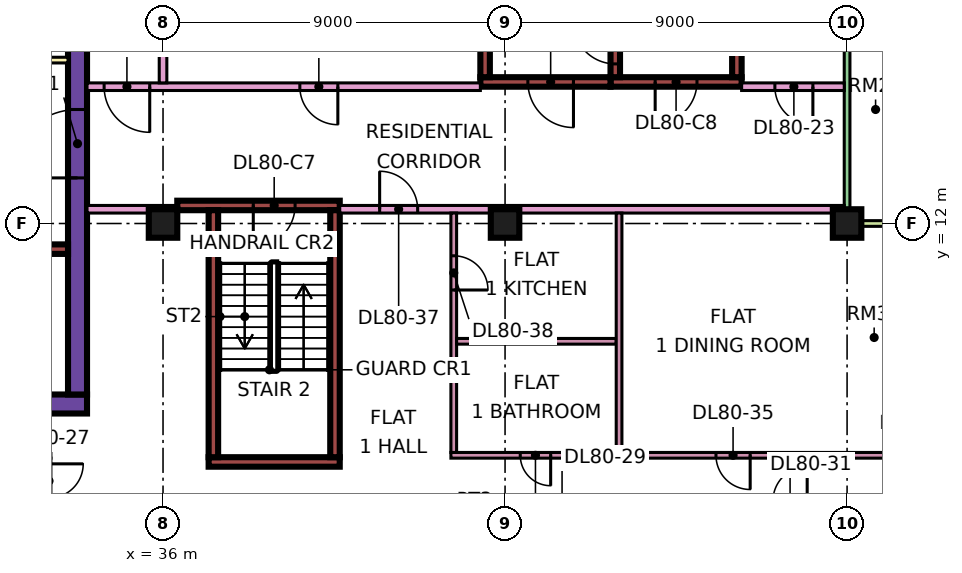
"""IFC4 building model, lengths in metres.
Left out: names, types, materials, properties, quantities, classifications, styles, units other than length and angle.
Written with IfcOpenShell. Run it as: python <this file> out.ifc"""

import sys

from ifc_helpers import new_model, si_unit, direction, frame, frame_2d, origin, origin_2d, place, context, subcontext, project, spatial, rectangle, extrude, element, fill, save


model = new_model("IFC4")
c1 = context("Model", 3, precision=1e-05, world=origin(), true_north=direction((0.0, 1.0)))
c2 = subcontext(c1, "Body", "Model", "MODEL_VIEW")
j1 = project(units=[si_unit("LENGTHUNIT", "METRE"), si_unit("PLANEANGLEUNIT", "RADIAN")], contexts=[c1])
p1 = place(None, origin())
s1 = spatial("IfcSite", under=j1, at=p1, CompositionType="ELEMENT")
p2 = place(p1, origin())
s2 = spatial("IfcBuilding", under=s1, at=p2, CompositionType="ELEMENT")
p3 = place(p2, frame((0.0, 0.0, 346.4)))
s3 = spatial("IfcBuildingStorey", under=s2, at=p3, CompositionType="ELEMENT", Elevation=346.4)
for number, where, z_axis, x_axis in (
    (1, (36.0, 12.0, 0.0), (0.0, 0.0, 1.0), (1.0, 0.0, 0.0)),
    (2, (45.0, 12.0, 0.0), (0.0, 0.0, 1.0), (1.0, 0.0, 0.0)),
    (3, (54.0, 12.0, 0.0), (0.0, 0.0, 1.0), (1.0, 0.0, 0.0)),
):
    element("IfcColumn", number, at=place(p3, frame(where, z_axis=z_axis, x_axis=x_axis)), inside=s3, PredefinedType="COLUMN", context=c2, shape_type="SweptSolid", body=[
        extrude(rectangle(XDim=0.75, YDim=0.75, at=origin_2d()), origin(), (0.0, 0.0, 1.0), 3.75),
    ])
p4 = place(p3, frame((9.0, 7.25, 0.0), z_axis=(0.0, 0.0, 1.0), x_axis=(1.0, 0.0, 0.0)))
e4 = element("IfcWall", 4, at=p4, inside=s3, PredefinedType="SHEAR", context=c2, shape_type="SweptSolid", body=[
    extrude(rectangle(XDim=25.0, YDim=0.5, at=frame_2d((12.5, 0.0))), origin(), (0.0, 0.0, 1.0), 3.75),
])
p5 = place(p3, frame((33.75, 7.5, 0.0), z_axis=(0.0, 0.0, 1.0), x_axis=(0.0, 1.0, 0.0)))
e5 = element("IfcWall", 5, at=p5, inside=s3, PredefinedType="SHEAR", context=c2, shape_type="SweptSolid", body=[
    extrude(rectangle(XDim=12.0, YDim=0.5, at=frame_2d((6.0, 0.0))), origin(), (0.0, 0.0, 1.0), 3.75),
])
p6 = place(p5, frame((5.7, 0.0, 0.0)))
e6 = element("IfcOpeningElement", 6, at=p6, cuts=e5, PredefinedType="OPENING", context=c2, shape_type="SweptSolid", body=[
    extrude(rectangle(XDim=1.8, YDim=2.4, at=frame_2d((0.9, 1.2))), frame((0.0, 0.26, 0.0), z_axis=(0.0, -1.0, 0.0), x_axis=(1.0, 0.0, 0.0)), (0.0, 0.0, 1.0), 0.52),
])
p7 = place(p3, frame((13.45, 11.325, 0.0), z_axis=(0.0, 0.0, 1.0), x_axis=(1.0, 0.0, 0.0)))
e7 = element("IfcWall", 7, at=p7, inside=s3, PredefinedType="SHEAR", context=c2, shape_type="SweptSolid", body=[
    extrude(rectangle(XDim=20.05, YDim=0.25, at=frame_2d((10.025, 0.0))), origin(), (0.0, 0.0, 1.0), 3.75),
])
p8 = place(p7, frame((1.55, 0.0, 0.0)))
e8 = element("IfcOpeningElement", 8, at=p8, cuts=e7, PredefinedType="OPENING", context=c2, shape_type="SweptSolid", body=[
    extrude(rectangle(XDim=0.9, YDim=2.1, at=frame_2d((0.45, 1.05))), frame((0.0, 0.135, 0.0), z_axis=(0.0, -1.0, 0.0), x_axis=(1.0, 0.0, 0.0)), (0.0, 0.0, 1.0), 0.27),
])
p9 = place(p7, frame((5.05, 0.0, 0.0)))
e9 = element("IfcOpeningElement", 9, at=p9, cuts=e7, PredefinedType="OPENING", context=c2, shape_type="SweptSolid", body=[
    extrude(rectangle(XDim=0.9, YDim=2.1, at=frame_2d((0.45, 1.05))), frame((0.0, 0.135, 0.0), z_axis=(0.0, -1.0, 0.0), x_axis=(1.0, 0.0, 0.0)), (0.0, 0.0, 1.0), 0.27),
])
p10 = place(p7, frame((8.425, 0.0, 0.0)))
e10 = element("IfcOpeningElement", 10, at=p10, cuts=e7, PredefinedType="OPENING", context=c2, shape_type="SweptSolid", body=[
    extrude(rectangle(XDim=0.9, YDim=2.1, at=frame_2d((0.45, 1.05))), frame((0.0, 0.135, 0.0), z_axis=(0.0, -1.0, 0.0), x_axis=(1.0, 0.0, 0.0)), (0.0, 0.0, 1.0), 0.27),
])
p11 = place(p7, frame((15.075, 0.0, 0.0)))
e11 = element("IfcOpeningElement", 11, at=p11, cuts=e7, PredefinedType="OPENING", context=c2, shape_type="SweptSolid", body=[
    extrude(rectangle(XDim=0.9, YDim=2.1, at=frame_2d((0.45, 1.05))), frame((0.0, 0.135, 0.0), z_axis=(0.0, -1.0, 0.0), x_axis=(1.0, 0.0, 0.0)), (0.0, 0.0, 1.0), 0.27),
])
p12 = place(p3, frame((37.2, 5.725, 0.0), z_axis=(0.0, 0.0, 1.0), x_axis=(1.0, 0.0, 0.0)))
e12 = element("IfcWall", 12, at=p12, inside=s3, PredefinedType="SHEAR", context=c2, shape_type="SweptSolid", body=[
    extrude(rectangle(XDim=3.45, YDim=0.25, at=frame_2d((1.725, 0.0))), origin(), (0.0, 0.0, 1.0), 3.75),
])
p13 = place(p3, frame((36.375, 12.475, 0.0), z_axis=(0.0, 0.0, 1.0), x_axis=(1.0, 0.0, 0.0)))
e13 = element("IfcWall", 13, at=p13, inside=s3, PredefinedType="SHEAR", context=c2, shape_type="SweptSolid", body=[
    extrude(rectangle(XDim=4.275, YDim=0.25, at=frame_2d((2.137, 0.0))), origin(), (0.0, 0.0, 1.0), 3.75),
])
p14 = place(p13, frame((2.0, 0.0, 0.0)))
e14 = element("IfcOpeningElement", 14, at=p14, cuts=e13, PredefinedType="OPENING", context=c2, shape_type="SweptSolid", body=[
    extrude(rectangle(XDim=1.1, YDim=2.2, at=frame_2d((0.55, 1.1))), frame((0.0, 0.135, 0.0), z_axis=(0.0, -1.0, 0.0), x_axis=(1.0, 0.0, 0.0)), (0.0, 0.0, 1.0), 0.27),
])
for number, where, z_axis, x_axis in (
    (15, (37.325, 5.85, 0.0), (0.0, 0.0, 1.0), (0.0, 1.0, 0.0)),
    (16, (40.525, 5.85, 0.0), (0.0, 0.0, 1.0), (0.0, 1.0, 0.0)),
):
    element("IfcWall", number, at=place(p3, frame(where, z_axis=z_axis, x_axis=x_axis)), inside=s3, PredefinedType="SHEAR", context=c2, shape_type="SweptSolid", body=[
        extrude(rectangle(XDim=6.5, YDim=0.25, at=frame_2d((3.25, 0.0))), origin(), (0.0, 0.0, 1.0), 3.75),
    ])
p15 = place(p3, frame((47.775, 15.725, 0.0), z_axis=(0.0, 0.0, 1.0), x_axis=(1.0, 0.0, 0.0)))
e17 = element("IfcWall", 17, at=p15, inside=s3, PredefinedType="SHEAR", context=c2, shape_type="SweptSolid", body=[
    extrude(rectangle(XDim=3.45, YDim=0.25, at=frame_2d((1.725, 0.0))), origin(), (0.0, 0.0, 1.0), 3.75),
])
p16 = place(p15, frame((1.175, 0.0, 0.0)))
e18 = element("IfcOpeningElement", 18, at=p16, cuts=e17, PredefinedType="OPENING", context=c2, shape_type="SweptSolid", body=[
    extrude(rectangle(XDim=1.1, YDim=2.2, at=frame_2d((0.55, 1.1))), frame((0.0, 0.135, 0.0), z_axis=(0.0, -1.0, 0.0), x_axis=(1.0, 0.0, 0.0)), (0.0, 0.0, 1.0), 0.27),
])
p17 = place(p3, frame((47.9, 15.85, 0.0), z_axis=(0.0, 0.0, 1.0), x_axis=(0.0, 1.0, 0.0)))
e19 = element("IfcWall", 19, at=p17, inside=s3, PredefinedType="SHEAR", context=c2, shape_type="SweptSolid", body=[
    extrude(rectangle(XDim=6.5, YDim=0.25, at=frame_2d((3.25, 0.0))), origin(), (0.0, 0.0, 1.0), 3.75),
])
p18 = place(p17, frame((0.35, 0.0, 0.0)))
e20 = element("IfcOpeningElement", 20, at=p18, cuts=e19, PredefinedType="OPENING", context=c2, shape_type="SweptSolid", body=[
    extrude(rectangle(XDim=1.1, YDim=2.2, at=frame_2d((0.55, 1.1))), frame((0.0, 0.135, 0.0), z_axis=(0.0, -1.0, 0.0), x_axis=(1.0, 0.0, 0.0)), (0.0, 0.0, 1.0), 0.27),
])
p19 = place(p3, frame((51.1, 15.85, 0.0), z_axis=(0.0, 0.0, 1.0), x_axis=(0.0, 1.0, 0.0)))
e21 = element("IfcWall", 21, at=p19, inside=s3, PredefinedType="SHEAR", context=c2, shape_type="SweptSolid", body=[
    extrude(rectangle(XDim=6.5, YDim=0.25, at=frame_2d((3.25, 0.0))), origin(), (0.0, 0.0, 1.0), 3.75),
])
p20 = place(p3, frame((44.35, 15.725, 0.0), z_axis=(0.0, 0.0, 1.0), x_axis=(1.0, 0.0, 0.0)))
e22 = element("IfcWall", 22, at=p20, inside=s3, PredefinedType="SHEAR", context=c2, shape_type="SweptSolid", body=[
    extrude(rectangle(XDim=3.425, YDim=0.25, at=frame_2d((1.712, 0.0))), origin(), (0.0, 0.0, 1.0), 3.75),
])
p21 = place(p20, frame((1.25, 0.0, 0.0)))
e23 = element("IfcOpeningElement", 23, at=p21, cuts=e22, PredefinedType="OPENING", context=c2, shape_type="SweptSolid", body=[
    extrude(rectangle(XDim=1.2, YDim=2.2, at=frame_2d((0.6, 1.1))), frame((0.0, 0.135, 0.0), z_axis=(0.0, -1.0, 0.0), x_axis=(1.0, 0.0, 0.0)), (0.0, 0.0, 1.0), 0.27),
])
p22 = place(p3, frame((44.475, 15.85, 0.0), z_axis=(0.0, 0.0, 1.0), x_axis=(0.0, 1.0, 0.0)))
e24 = element("IfcWall", 24, at=p22, inside=s3, PredefinedType="SHEAR", context=c2, shape_type="SweptSolid", body=[
    extrude(rectangle(XDim=6.5, YDim=0.25, at=frame_2d((3.25, 0.0))), origin(), (0.0, 0.0, 1.0), 3.75),
])
p23 = place(p22, frame((1.75, 0.0, 0.0)))
e25 = element("IfcOpeningElement", 25, at=p23, cuts=e24, PredefinedType="OPENING", context=c2, shape_type="SweptSolid", body=[
    extrude(rectangle(XDim=1.1, YDim=2.2, at=frame_2d((0.55, 1.1))), frame((0.0, 0.135, 0.0), z_axis=(0.0, -1.0, 0.0), x_axis=(1.0, 0.0, 0.0)), (0.0, 0.0, 1.0), 0.27),
])
p24 = place(p22, frame((4.3, 0.0, 0.0)))
e26 = element("IfcOpeningElement", 26, at=p24, cuts=e24, PredefinedType="OPENING", context=c2, shape_type="SweptSolid", body=[
    extrude(rectangle(XDim=1.1, YDim=2.2, at=frame_2d((0.55, 1.1))), frame((0.0, 0.135, 0.0), z_axis=(0.0, -1.0, 0.0), x_axis=(1.0, 0.0, 0.0)), (0.0, 0.0, 1.0), 0.27),
])
p25 = place(p3, frame((54.0, 12.075, 0.0), z_axis=(0.0, 0.0, 1.0), x_axis=(0.0, 1.0, 0.0)))
e27 = element("IfcWall", 27, at=p25, inside=s3, PredefinedType="SOLIDWALL", context=c2, shape_type="SweptSolid", body=[
    extrude(rectangle(XDim=10.35, YDim=0.15, at=frame_2d((5.175, 0.0))), origin(), (0.0, 0.0, 1.0), 3.35),
])
p26 = place(p25, frame((4.538, 0.0, 0.45)))
e28 = element("IfcOpeningElement", 28, at=p26, cuts=e27, PredefinedType="OPENING", context=c2, shape_type="SweptSolid", body=[
    extrude(rectangle(XDim=4.8, YDim=2.4, at=frame_2d((2.4, 1.2))), frame((0.0, 0.085, 0.0), z_axis=(0.0, -1.0, 0.0), x_axis=(1.0, 0.0, 0.0)), (0.0, 0.0, 1.0), 0.17),
])
p27 = place(p3, frame((55.5, 12.0, 0.0), z_axis=(0.0, 0.0, 1.0), x_axis=(-1.0, 0.0, 0.0)))
e29 = element("IfcWall", 29, at=p27, inside=s3, PredefinedType="SOLIDWALL", context=c2, shape_type="SweptSolid", body=[
    extrude(rectangle(XDim=1.5, YDim=0.15, at=frame_2d((0.75, 0.0))), origin(), (0.0, 0.0, 1.0), 3.35),
])
p28 = place(p3, frame((31.5, 16.3, 0.0), z_axis=(0.0, 0.0, 1.0), x_axis=(1.0, 0.0, 0.0)))
e30 = element("IfcWall", 30, at=p28, inside=s3, PredefinedType="PARTITIONING", context=c2, shape_type="SweptSolid", body=[
    extrude(rectangle(XDim=2.0, YDim=0.15, at=frame_2d((1.0, 0.0))), origin(), (0.0, 0.0, 1.0), 3.35),
])
p29 = place(p3, frame((34.0, 12.375, 0.0), z_axis=(0.0, 0.0, 1.0), x_axis=(1.0, 0.0, 0.0)))
e31 = element("IfcWall", 31, at=p29, inside=s3, PredefinedType="PARTITIONING", context=c2, shape_type="SweptSolid", body=[
    extrude(rectangle(XDim=2.376, YDim=0.2, at=frame_2d((1.188, 0.0))), origin(), (0.0, 0.0, 1.0), 3.35),
])
p30 = place(p3, frame((34.0, 15.6, 0.0), z_axis=(0.0, 0.0, 1.0), x_axis=(1.0, 0.0, 0.0)))
e32 = element("IfcWall", 32, at=p30, inside=s3, PredefinedType="PARTITIONING", context=c2, shape_type="SweptSolid", body=[
    extrude(rectangle(XDim=10.35, YDim=0.2, at=frame_2d((5.175, 0.0))), origin(), (0.0, 0.0, 1.0), 3.35),
])
p31 = place(p30, frame((5.6, 0.0, 0.0)))
e33 = element("IfcOpeningElement", 33, at=p31, cuts=e32, PredefinedType="OPENING", context=c2, shape_type="SweptSolid", body=[
    extrude(rectangle(XDim=1.0, YDim=2.1, at=frame_2d((0.5, 1.05))), frame((0.0, 0.11, 0.0), z_axis=(0.0, -1.0, 0.0), x_axis=(1.0, 0.0, 0.0)), (0.0, 0.0, 1.0), 0.22),
])
p32 = place(p30, frame((0.45, 0.0, 0.0)))
e34 = element("IfcOpeningElement", 34, at=p32, cuts=e32, PredefinedType="OPENING", context=c2, shape_type="SweptSolid", body=[
    extrude(rectangle(XDim=1.2, YDim=2.1, at=frame_2d((0.6, 1.05))), frame((0.0, 0.11, 0.0), z_axis=(0.0, -1.0, 0.0), x_axis=(1.0, 0.0, 0.0)), (0.0, 0.0, 1.0), 0.22),
])
p33 = place(p3, frame((36.0, 15.7, 0.0), z_axis=(0.0, 0.0, 1.0), x_axis=(0.0, 1.0, 0.0)))
e35 = element("IfcWall", 35, at=p33, inside=s3, PredefinedType="PARTITIONING", context=c2, shape_type="SweptSolid", body=[
    extrude(rectangle(XDim=8.3, YDim=0.2, at=frame_2d((4.15, 0.0))), origin(), (0.0, 0.0, 1.0), 3.35),
])
p34 = place(p3, frame((40.65, 12.375, 0.0), z_axis=(0.0, 0.0, 1.0), x_axis=(1.0, 0.0, 0.0)))
e36 = element("IfcWall", 36, at=p34, inside=s3, PredefinedType="PARTITIONING", context=c2, shape_type="SweptSolid", body=[
    extrude(rectangle(XDim=13.276, YDim=0.2, at=frame_2d((6.638, 0.0))), origin(), (0.0, 0.0, 1.0), 3.35),
])
p35 = place(p34, frame((1.05, 0.0, 0.0)))
e37 = element("IfcOpeningElement", 37, at=p35, cuts=e36, PredefinedType="OPENING", context=c2, shape_type="SweptSolid", body=[
    extrude(rectangle(XDim=1.0, YDim=2.1, at=frame_2d((0.5, 1.05))), frame((0.0, 0.11, 0.0), z_axis=(0.0, -1.0, 0.0), x_axis=(1.0, 0.0, 0.0)), (0.0, 0.0, 1.0), 0.22),
])
p36 = place(p3, frame((43.575, 5.9, 0.0), z_axis=(0.0, 0.0, 1.0), x_axis=(1.0, 0.0, 0.0)))
e38 = element("IfcWall", 38, at=p36, inside=s3, PredefinedType="PARTITIONING", context=c2, shape_type="SweptSolid", body=[
    extrude(rectangle(XDim=11.775, YDim=0.15, at=frame_2d((5.888, 0.0))), origin(), (0.0, 0.0, 1.0), 3.35),
])
p37 = place(p36, frame((1.825, 0.0, 0.0)))
e39 = element("IfcOpeningElement", 39, at=p37, cuts=e38, PredefinedType="OPENING", context=c2, shape_type="SweptSolid", body=[
    extrude(rectangle(XDim=0.8, YDim=2.1, at=frame_2d((0.4, 1.05))), frame((0.0, 0.085, 0.0), z_axis=(0.0, -1.0, 0.0), x_axis=(1.0, 0.0, 0.0)), (0.0, 0.0, 1.0), 0.17),
])
p38 = place(p36, frame((6.975, 0.0, 0.0)))
e40 = element("IfcOpeningElement", 40, at=p38, cuts=e38, PredefinedType="OPENING", context=c2, shape_type="SweptSolid", body=[
    extrude(rectangle(XDim=0.9, YDim=2.1, at=frame_2d((0.45, 1.05))), frame((0.0, 0.085, 0.0), z_axis=(0.0, -1.0, 0.0), x_axis=(1.0, 0.0, 0.0)), (0.0, 0.0, 1.0), 0.17),
])
p39 = place(p3, frame((43.65, 5.975, 0.0), z_axis=(0.0, 0.0, 1.0), x_axis=(0.0, 1.0, 0.0)))
e41 = element("IfcWall", 41, at=p39, inside=s3, PredefinedType="PARTITIONING", context=c2, shape_type="SweptSolid", body=[
    extrude(rectangle(XDim=6.3, YDim=0.15, at=frame_2d((3.15, 0.0))), origin(), (0.0, 0.0, 1.0), 3.35),
])
p40 = place(p39, frame((4.275, 0.0, 0.0)))
e42 = element("IfcOpeningElement", 42, at=p40, cuts=e41, PredefinedType="OPENING", context=c2, shape_type="SweptSolid", body=[
    extrude(rectangle(XDim=0.9, YDim=2.1, at=frame_2d((0.45, 1.05))), frame((0.0, 0.085, 0.0), z_axis=(0.0, -1.0, 0.0), x_axis=(1.0, 0.0, 0.0)), (0.0, 0.0, 1.0), 0.17),
])
p41 = place(p3, frame((43.725, 8.9, 0.0), z_axis=(0.0, 0.0, 1.0), x_axis=(1.0, 0.0, 0.0)))
e43 = element("IfcWall", 43, at=p41, inside=s3, PredefinedType="PARTITIONING", context=c2, shape_type="SweptSolid", body=[
    extrude(rectangle(XDim=4.2, YDim=0.15, at=frame_2d((2.1, 0.0))), origin(), (0.0, 0.0, 1.0), 3.35),
])
p42 = place(p3, frame((48.0, 5.975, 0.0), z_axis=(0.0, 0.0, 1.0), x_axis=(0.0, 1.0, 0.0)))
e44 = element("IfcWall", 44, at=p42, inside=s3, PredefinedType="PARTITIONING", context=c2, shape_type="SweptSolid", body=[
    extrude(rectangle(XDim=6.3, YDim=0.15, at=frame_2d((3.15, 0.0))), origin(), (0.0, 0.0, 1.0), 3.35),
])
p43 = place(p3, frame((51.225, 15.6, 0.0), z_axis=(0.0, 0.0, 1.0), x_axis=(1.0, 0.0, 0.0)))
e45 = element("IfcWall", 45, at=p43, inside=s3, PredefinedType="PARTITIONING", context=c2, shape_type="SweptSolid", body=[
    extrude(rectangle(XDim=2.701, YDim=0.2, at=frame_2d((1.351, 0.0))), origin(), (0.0, 0.0, 1.0), 3.35),
])
p44 = place(p43, frame((0.875, 0.0, 0.0)))
e46 = element("IfcOpeningElement", 46, at=p44, cuts=e45, PredefinedType="OPENING", context=c2, shape_type="SweptSolid", body=[
    extrude(rectangle(XDim=1.0, YDim=2.1, at=frame_2d((0.5, 1.05))), frame((0.0, 0.11, 0.0), z_axis=(0.0, -1.0, 0.0), x_axis=(1.0, 0.0, 0.0)), (0.0, 0.0, 1.0), 0.22),
])
p45 = place(p6, origin())
e47 = element("IfcDoor", 47, at=p45, inside=s3, OperationType="DOUBLE_DOOR_SINGLE_SWING", PredefinedType="DOOR", context=c2, shape_type="SweptSolid", body=[
    extrude(rectangle(XDim=1.8, YDim=2.4, at=frame_2d((0.9, 1.2))), frame((0.0, 0.025, 0.0), z_axis=(0.0, -1.0, 0.0), x_axis=(1.0, 0.0, 0.0)), (0.0, 0.0, 1.0), 0.05),
])
fill(e6, e47)
p46 = place(p14, frame((1.1, 0.0, 0.0), z_axis=(0.0, 0.0, 1.0), x_axis=(-1.0, 0.0, 0.0)))
e48 = element("IfcDoor", 48, at=p46, inside=s3, OperationType="SINGLE_SWING_LEFT", PredefinedType="DOOR", context=c2, shape_type="SweptSolid", body=[
    extrude(rectangle(XDim=1.1, YDim=2.2, at=frame_2d((0.55, 1.1))), frame((0.0, 0.025, 0.0), z_axis=(0.0, -1.0, 0.0), x_axis=(1.0, 0.0, 0.0)), (0.0, 0.0, 1.0), 0.05),
])
fill(e14, e48)
p47 = place(p16, frame((1.1, 0.0, 0.0), z_axis=(0.0, 0.0, 1.0), x_axis=(-1.0, 0.0, 0.0)))
e49 = element("IfcDoor", 49, at=p47, inside=s3, OperationType="SINGLE_SWING_LEFT", PredefinedType="DOOR", context=c2, shape_type="SweptSolid", body=[
    extrude(rectangle(XDim=1.1, YDim=2.2, at=frame_2d((0.55, 1.1))), frame((0.0, 0.025, 0.0), z_axis=(0.0, -1.0, 0.0), x_axis=(1.0, 0.0, 0.0)), (0.0, 0.0, 1.0), 0.05),
])
fill(e18, e49)
p48 = place(p21, origin())
e50 = element("IfcDoor", 50, at=p48, inside=s3, OperationType="SINGLE_SWING_RIGHT", PredefinedType="DOOR", context=c2, shape_type="SweptSolid", body=[
    extrude(rectangle(XDim=1.2, YDim=2.2, at=frame_2d((0.6, 1.1))), frame((0.0, 0.025, 0.0), z_axis=(0.0, -1.0, 0.0), x_axis=(1.0, 0.0, 0.0)), (0.0, 0.0, 1.0), 0.05),
])
fill(e23, e50)
p49 = place(p18, frame((1.1, 0.0, 0.0), z_axis=(0.0, 0.0, 1.0), x_axis=(-1.0, 0.0, 0.0)))
e51 = element("IfcDoor", 51, at=p49, inside=s3, OperationType="SINGLE_SWING_RIGHT", PredefinedType="DOOR", context=c2, shape_type="SweptSolid", body=[
    extrude(rectangle(XDim=1.1, YDim=2.2, at=frame_2d((0.55, 1.1))), frame((0.0, 0.025, 0.0), z_axis=(0.0, -1.0, 0.0), x_axis=(1.0, 0.0, 0.0)), (0.0, 0.0, 1.0), 0.05),
])
fill(e20, e51)
p50 = place(p31, origin())
e52 = element("IfcDoor", 52, at=p50, inside=s3, OperationType="SINGLE_SWING_RIGHT", PredefinedType="DOOR", context=c2, shape_type="SweptSolid", body=[
    extrude(rectangle(XDim=1.0, YDim=2.1, at=frame_2d((0.5, 1.05))), frame((0.0, 0.025, 0.0), z_axis=(0.0, -1.0, 0.0), x_axis=(1.0, 0.0, 0.0)), (0.0, 0.0, 1.0), 0.05),
])
fill(e33, e52)
p51 = place(p32, origin())
e53 = element("IfcDoor", 53, at=p51, inside=s3, OperationType="SINGLE_SWING_RIGHT", PredefinedType="DOOR", context=c2, shape_type="SweptSolid", body=[
    extrude(rectangle(XDim=1.2, YDim=2.1, at=frame_2d((0.6, 1.05))), frame((0.0, 0.025, 0.0), z_axis=(0.0, -1.0, 0.0), x_axis=(1.0, 0.0, 0.0)), (0.0, 0.0, 1.0), 0.05),
])
fill(e34, e53)
p52 = place(p44, origin())
e54 = element("IfcDoor", 54, at=p52, inside=s3, OperationType="SINGLE_SWING_RIGHT", PredefinedType="DOOR", context=c2, shape_type="SweptSolid", body=[
    extrude(rectangle(XDim=1.0, YDim=2.1, at=frame_2d((0.5, 1.05))), frame((0.0, 0.025, 0.0), z_axis=(0.0, -1.0, 0.0), x_axis=(1.0, 0.0, 0.0)), (0.0, 0.0, 1.0), 0.05),
])
fill(e46, e54)
p53 = place(p37, origin())
e55 = element("IfcDoor", 55, at=p53, inside=s3, OperationType="SINGLE_SWING_RIGHT", PredefinedType="DOOR", context=c2, shape_type="SweptSolid", body=[
    extrude(rectangle(XDim=0.8, YDim=2.1, at=frame_2d((0.4, 1.05))), frame((0.0, 0.025, 0.0), z_axis=(0.0, -1.0, 0.0), x_axis=(1.0, 0.0, 0.0)), (0.0, 0.0, 1.0), 0.05),
])
fill(e39, e55)
p54 = place(p38, origin())
e56 = element("IfcDoor", 56, at=p54, inside=s3, OperationType="SINGLE_SWING_RIGHT", PredefinedType="DOOR", context=c2, shape_type="SweptSolid", body=[
    extrude(rectangle(XDim=0.9, YDim=2.1, at=frame_2d((0.45, 1.05))), frame((0.0, 0.025, 0.0), z_axis=(0.0, -1.0, 0.0), x_axis=(1.0, 0.0, 0.0)), (0.0, 0.0, 1.0), 0.05),
])
fill(e40, e56)
p55 = place(p35, origin())
e57 = element("IfcDoor", 57, at=p55, inside=s3, OperationType="SINGLE_SWING_LEFT", PredefinedType="DOOR", context=c2, shape_type="SweptSolid", body=[
    extrude(rectangle(XDim=1.0, YDim=2.1, at=frame_2d((0.5, 1.05))), frame((0.0, 0.025, 0.0), z_axis=(0.0, -1.0, 0.0), x_axis=(1.0, 0.0, 0.0)), (0.0, 0.0, 1.0), 0.05),
])
fill(e37, e57)
p56 = place(p40, frame((0.9, 0.0, 0.0), z_axis=(0.0, 0.0, 1.0), x_axis=(-1.0, 0.0, 0.0)))
e58 = element("IfcDoor", 58, at=p56, inside=s3, OperationType="SINGLE_SWING_LEFT", PredefinedType="DOOR", context=c2, shape_type="SweptSolid", body=[
    extrude(rectangle(XDim=0.9, YDim=2.1, at=frame_2d((0.45, 1.05))), frame((0.0, 0.025, 0.0), z_axis=(0.0, -1.0, 0.0), x_axis=(1.0, 0.0, 0.0)), (0.0, 0.0, 1.0), 0.05),
])
fill(e42, e58)
save(model, sys.argv[1])
